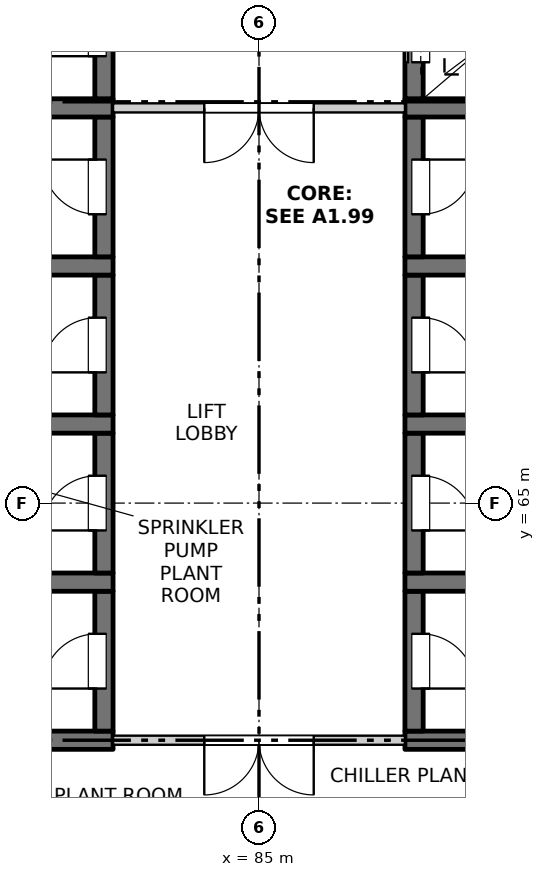
"""IFC4 building model, lengths in metres.
Left out: names, types, materials, properties, quantities, classifications, styles, units other than length and angle.
Written with IfcOpenShell. Run it as: python <this file> out.ifc"""

import sys

from ifc_helpers import new_model, si_unit, direction, frame, frame_2d, origin, place, context, subcontext, project, spatial, rectangle, extrude, element, fill, save


model = new_model("IFC4")
c1 = context("Model", 3, precision=1e-05, world=origin(), true_north=direction((0.0, 1.0)))
c2 = subcontext(c1, "Body", "Model", "MODEL_VIEW")
j1 = project(units=[si_unit("LENGTHUNIT", "METRE"), si_unit("PLANEANGLEUNIT", "RADIAN")], contexts=[c1])
p1 = place(None, origin())
s1 = spatial("IfcSite", under=j1, at=p1, CompositionType="ELEMENT")
p2 = place(p1, origin())
s2 = spatial("IfcBuilding", under=s1, at=p2, CompositionType="ELEMENT")
p3 = place(p2, frame((0.0, 0.0, 192.8)))
s3 = spatial("IfcBuildingStorey", under=s2, at=p3, CompositionType="ELEMENT", Elevation=192.8)
p4 = place(p3, frame((79.6, 61.1, -0.3), z_axis=(0.0, 0.0, 1.0), x_axis=(1.0, 0.0, 0.0)))
e1 = element("IfcWall", 1, at=p4, inside=s3, PredefinedType="SOLIDWALL", context=c2, shape_type="SweptSolid", body=[
    extrude(rectangle(XDim=3.0, YDim=0.3, at=frame_2d((1.5, 0.0))), origin(), (0.0, 0.0, 1.0), 4.5),
])
p5 = place(p3, frame((82.45, 61.25, -0.3), z_axis=(0.0, 0.0, 1.0), x_axis=(0.0, 1.0, 0.0)))
e2 = element("IfcWall", 2, at=p5, inside=s3, PredefinedType="SOLIDWALL", context=c2, shape_type="SweptSolid", body=[
    extrude(rectangle(XDim=2.3, YDim=0.3, at=frame_2d((1.15, 0.0))), origin(), (0.0, 0.0, 1.0), 4.5),
])
p6 = place(p5, frame((0.7, 0.0, 0.3)))
e3 = element("IfcOpeningElement", 3, at=p6, cuts=e2, PredefinedType="OPENING", context=c2, shape_type="SweptSolid", body=[
    extrude(rectangle(XDim=0.9, YDim=2.1, at=frame_2d((0.45, 1.05))), frame((0.0, 0.16, 0.0), z_axis=(0.0, -1.0, 0.0), x_axis=(1.0, 0.0, 0.0)), (0.0, 0.0, 1.0), 0.32),
])
p7 = place(p3, frame((79.6, 63.7, -0.3), z_axis=(0.0, 0.0, 1.0), x_axis=(1.0, 0.0, 0.0)))
e4 = element("IfcWall", 4, at=p7, inside=s3, PredefinedType="SOLIDWALL", context=c2, shape_type="SweptSolid", body=[
    extrude(rectangle(XDim=3.0, YDim=0.3, at=frame_2d((1.5, 0.0))), origin(), (0.0, 0.0, 1.0), 4.5),
])
p8 = place(p3, frame((82.45, 63.85, -0.3), z_axis=(0.0, 0.0, 1.0), x_axis=(0.0, 1.0, 0.0)))
e5 = element("IfcWall", 5, at=p8, inside=s3, PredefinedType="SOLIDWALL", context=c2, shape_type="SweptSolid", body=[
    extrude(rectangle(XDim=2.3, YDim=0.3, at=frame_2d((1.15, 0.0))), origin(), (0.0, 0.0, 1.0), 4.5),
])
p9 = place(p8, frame((0.7, 0.0, 0.3)))
e6 = element("IfcOpeningElement", 6, at=p9, cuts=e5, PredefinedType="OPENING", context=c2, shape_type="SweptSolid", body=[
    extrude(rectangle(XDim=0.9, YDim=2.1, at=frame_2d((0.45, 1.05))), frame((0.0, 0.16, 0.0), z_axis=(0.0, -1.0, 0.0), x_axis=(1.0, 0.0, 0.0)), (0.0, 0.0, 1.0), 0.32),
])
p10 = place(p3, frame((79.6, 66.3, -0.3), z_axis=(0.0, 0.0, 1.0), x_axis=(1.0, 0.0, 0.0)))
e7 = element("IfcWall", 7, at=p10, inside=s3, PredefinedType="SOLIDWALL", context=c2, shape_type="SweptSolid", body=[
    extrude(rectangle(XDim=3.0, YDim=0.3, at=frame_2d((1.5, 0.0))), origin(), (0.0, 0.0, 1.0), 4.5),
])
p11 = place(p3, frame((82.45, 66.45, -0.3), z_axis=(0.0, 0.0, 1.0), x_axis=(0.0, 1.0, 0.0)))
e8 = element("IfcWall", 8, at=p11, inside=s3, PredefinedType="SOLIDWALL", context=c2, shape_type="SweptSolid", body=[
    extrude(rectangle(XDim=2.3, YDim=0.3, at=frame_2d((1.15, 0.0))), origin(), (0.0, 0.0, 1.0), 4.5),
])
p12 = place(p11, frame((0.7, 0.0, 0.3)))
e9 = element("IfcOpeningElement", 9, at=p12, cuts=e8, PredefinedType="OPENING", context=c2, shape_type="SweptSolid", body=[
    extrude(rectangle(XDim=0.9, YDim=2.1, at=frame_2d((0.45, 1.05))), frame((0.0, 0.16, 0.0), z_axis=(0.0, -1.0, 0.0), x_axis=(1.0, 0.0, 0.0)), (0.0, 0.0, 1.0), 0.32),
])
p13 = place(p3, frame((79.6, 68.9, -0.3), z_axis=(0.0, 0.0, 1.0), x_axis=(1.0, 0.0, 0.0)))
e10 = element("IfcWall", 10, at=p13, inside=s3, PredefinedType="SOLIDWALL", context=c2, shape_type="SweptSolid", body=[
    extrude(rectangle(XDim=3.0, YDim=0.3, at=frame_2d((1.5, 0.0))), origin(), (0.0, 0.0, 1.0), 4.5),
])
p14 = place(p3, frame((82.45, 69.05, -0.3), z_axis=(0.0, 0.0, 1.0), x_axis=(0.0, 1.0, 0.0)))
e11 = element("IfcWall", 11, at=p14, inside=s3, PredefinedType="SOLIDWALL", context=c2, shape_type="SweptSolid", body=[
    extrude(rectangle(XDim=2.3, YDim=0.3, at=frame_2d((1.15, 0.0))), origin(), (0.0, 0.0, 1.0), 4.5),
])
p15 = place(p14, frame((0.7, 0.0, 0.3)))
e12 = element("IfcOpeningElement", 12, at=p15, cuts=e11, PredefinedType="OPENING", context=c2, shape_type="SweptSolid", body=[
    extrude(rectangle(XDim=0.9, YDim=2.1, at=frame_2d((0.45, 1.05))), frame((0.0, 0.16, 0.0), z_axis=(0.0, -1.0, 0.0), x_axis=(1.0, 0.0, 0.0)), (0.0, 0.0, 1.0), 0.32),
])
p16 = place(p3, frame((79.6, 71.5, -0.3), z_axis=(0.0, 0.0, 1.0), x_axis=(1.0, 0.0, 0.0)))
e13 = element("IfcWall", 13, at=p16, inside=s3, PredefinedType="SOLIDWALL", context=c2, shape_type="SweptSolid", body=[
    extrude(rectangle(XDim=3.0, YDim=0.3, at=frame_2d((1.5, 0.0))), origin(), (0.0, 0.0, 1.0), 4.5),
])
p17 = place(p3, frame((82.45, 71.65, -0.3), z_axis=(0.0, 0.0, 1.0), x_axis=(0.0, 1.0, 0.0)))
e14 = element("IfcWall", 14, at=p17, inside=s3, PredefinedType="SOLIDWALL", context=c2, shape_type="SweptSolid", body=[
    extrude(rectangle(XDim=2.3, YDim=0.3, at=frame_2d((1.15, 0.0))), origin(), (0.0, 0.0, 1.0), 4.5),
])
p18 = place(p17, frame((0.7, 0.0, 0.3)))
e15 = element("IfcOpeningElement", 15, at=p18, cuts=e14, PredefinedType="OPENING", context=c2, shape_type="SweptSolid", body=[
    extrude(rectangle(XDim=0.9, YDim=2.1, at=frame_2d((0.45, 1.05))), frame((0.0, 0.16, 0.0), z_axis=(0.0, -1.0, 0.0), x_axis=(1.0, 0.0, 0.0)), (0.0, 0.0, 1.0), 0.32),
])
p19 = place(p3, frame((87.4, 61.1, -0.3), z_axis=(0.0, 0.0, 1.0), x_axis=(1.0, 0.0, 0.0)))
e16 = element("IfcWall", 16, at=p19, inside=s3, PredefinedType="SOLIDWALL", context=c2, shape_type="SweptSolid", body=[
    extrude(rectangle(XDim=3.0, YDim=0.3, at=frame_2d((1.5, 0.0))), origin(), (0.0, 0.0, 1.0), 4.5),
])
p20 = place(p3, frame((87.55, 61.25, -0.3), z_axis=(0.0, 0.0, 1.0), x_axis=(0.0, 1.0, 0.0)))
e17 = element("IfcWall", 17, at=p20, inside=s3, PredefinedType="SOLIDWALL", context=c2, shape_type="SweptSolid", body=[
    extrude(rectangle(XDim=2.3, YDim=0.3, at=frame_2d((1.15, 0.0))), origin(), (0.0, 0.0, 1.0), 4.5),
])
p21 = place(p20, frame((0.7, 0.0, 0.3)))
e18 = element("IfcOpeningElement", 18, at=p21, cuts=e17, PredefinedType="OPENING", context=c2, shape_type="SweptSolid", body=[
    extrude(rectangle(XDim=0.9, YDim=2.1, at=frame_2d((0.45, 1.05))), frame((0.0, 0.16, 0.0), z_axis=(0.0, -1.0, 0.0), x_axis=(1.0, 0.0, 0.0)), (0.0, 0.0, 1.0), 0.32),
])
p22 = place(p3, frame((87.4, 63.7, -0.3), z_axis=(0.0, 0.0, 1.0), x_axis=(1.0, 0.0, 0.0)))
e19 = element("IfcWall", 19, at=p22, inside=s3, PredefinedType="SOLIDWALL", context=c2, shape_type="SweptSolid", body=[
    extrude(rectangle(XDim=3.0, YDim=0.3, at=frame_2d((1.5, 0.0))), origin(), (0.0, 0.0, 1.0), 4.5),
])
p23 = place(p3, frame((87.55, 63.85, -0.3), z_axis=(0.0, 0.0, 1.0), x_axis=(0.0, 1.0, 0.0)))
e20 = element("IfcWall", 20, at=p23, inside=s3, PredefinedType="SOLIDWALL", context=c2, shape_type="SweptSolid", body=[
    extrude(rectangle(XDim=2.3, YDim=0.3, at=frame_2d((1.15, 0.0))), origin(), (0.0, 0.0, 1.0), 4.5),
])
p24 = place(p23, frame((0.7, 0.0, 0.3)))
e21 = element("IfcOpeningElement", 21, at=p24, cuts=e20, PredefinedType="OPENING", context=c2, shape_type="SweptSolid", body=[
    extrude(rectangle(XDim=0.9, YDim=2.1, at=frame_2d((0.45, 1.05))), frame((0.0, 0.16, 0.0), z_axis=(0.0, -1.0, 0.0), x_axis=(1.0, 0.0, 0.0)), (0.0, 0.0, 1.0), 0.32),
])
p25 = place(p3, frame((87.4, 66.3, -0.3), z_axis=(0.0, 0.0, 1.0), x_axis=(1.0, 0.0, 0.0)))
e22 = element("IfcWall", 22, at=p25, inside=s3, PredefinedType="SOLIDWALL", context=c2, shape_type="SweptSolid", body=[
    extrude(rectangle(XDim=3.0, YDim=0.3, at=frame_2d((1.5, 0.0))), origin(), (0.0, 0.0, 1.0), 4.5),
])
p26 = place(p3, frame((87.55, 66.45, -0.3), z_axis=(0.0, 0.0, 1.0), x_axis=(0.0, 1.0, 0.0)))
e23 = element("IfcWall", 23, at=p26, inside=s3, PredefinedType="SOLIDWALL", context=c2, shape_type="SweptSolid", body=[
    extrude(rectangle(XDim=2.3, YDim=0.3, at=frame_2d((1.15, 0.0))), origin(), (0.0, 0.0, 1.0), 4.5),
])
p27 = place(p26, frame((0.7, 0.0, 0.3)))
e24 = element("IfcOpeningElement", 24, at=p27, cuts=e23, PredefinedType="OPENING", context=c2, shape_type="SweptSolid", body=[
    extrude(rectangle(XDim=0.9, YDim=2.1, at=frame_2d((0.45, 1.05))), frame((0.0, 0.16, 0.0), z_axis=(0.0, -1.0, 0.0), x_axis=(1.0, 0.0, 0.0)), (0.0, 0.0, 1.0), 0.32),
])
p28 = place(p3, frame((87.4, 68.9, -0.3), z_axis=(0.0, 0.0, 1.0), x_axis=(1.0, 0.0, 0.0)))
e25 = element("IfcWall", 25, at=p28, inside=s3, PredefinedType="SOLIDWALL", context=c2, shape_type="SweptSolid", body=[
    extrude(rectangle(XDim=3.0, YDim=0.3, at=frame_2d((1.5, 0.0))), origin(), (0.0, 0.0, 1.0), 4.5),
])
p29 = place(p3, frame((87.55, 69.05, -0.3), z_axis=(0.0, 0.0, 1.0), x_axis=(0.0, 1.0, 0.0)))
e26 = element("IfcWall", 26, at=p29, inside=s3, PredefinedType="SOLIDWALL", context=c2, shape_type="SweptSolid", body=[
    extrude(rectangle(XDim=2.3, YDim=0.3, at=frame_2d((1.15, 0.0))), origin(), (0.0, 0.0, 1.0), 4.5),
])
p30 = place(p29, frame((0.7, 0.0, 0.3)))
e27 = element("IfcOpeningElement", 27, at=p30, cuts=e26, PredefinedType="OPENING", context=c2, shape_type="SweptSolid", body=[
    extrude(rectangle(XDim=0.9, YDim=2.1, at=frame_2d((0.45, 1.05))), frame((0.0, 0.16, 0.0), z_axis=(0.0, -1.0, 0.0), x_axis=(1.0, 0.0, 0.0)), (0.0, 0.0, 1.0), 0.32),
])
p31 = place(p3, frame((87.4, 71.5, -0.3), z_axis=(0.0, 0.0, 1.0), x_axis=(1.0, 0.0, 0.0)))
e28 = element("IfcWall", 28, at=p31, inside=s3, PredefinedType="SOLIDWALL", context=c2, shape_type="SweptSolid", body=[
    extrude(rectangle(XDim=3.0, YDim=0.3, at=frame_2d((1.5, 0.0))), origin(), (0.0, 0.0, 1.0), 4.5),
])
p32 = place(p3, frame((87.55, 71.65, -0.3), z_axis=(0.0, 0.0, 1.0), x_axis=(0.0, 1.0, 0.0)))
e29 = element("IfcWall", 29, at=p32, inside=s3, PredefinedType="SOLIDWALL", context=c2, shape_type="SweptSolid", body=[
    extrude(rectangle(XDim=2.3, YDim=0.3, at=frame_2d((1.15, 0.0))), origin(), (0.0, 0.0, 1.0), 4.5),
])
p33 = place(p32, frame((0.6, 0.0, 0.3)))
e30 = element("IfcOpeningElement", 30, at=p33, cuts=e29, PredefinedType="OPENING", context=c2, shape_type="SweptSolid", body=[
    extrude(rectangle(XDim=1.1, YDim=2.1, at=frame_2d((0.55, 1.05))), frame((0.0, 0.16, 0.0), z_axis=(0.0, -1.0, 0.0), x_axis=(1.0, 0.0, 0.0)), (0.0, 0.0, 1.0), 0.32),
])
p34 = place(p3, frame((82.6, 61.1, 0.0), z_axis=(0.0, 0.0, 1.0), x_axis=(1.0, 0.0, 0.0)))
e31 = element("IfcWall", 31, at=p34, inside=s3, PredefinedType="PARTITIONING", context=c2, shape_type="SweptSolid", body=[
    extrude(rectangle(XDim=4.8, YDim=0.15, at=frame_2d((2.4, 0.0))), origin(), (0.0, 0.0, 1.0), 4.2),
])
p35 = place(p34, frame((1.5, 0.0, 0.0)))
e32 = element("IfcOpeningElement", 32, at=p35, cuts=e31, PredefinedType="OPENING", context=c2, shape_type="SweptSolid", body=[
    extrude(rectangle(XDim=1.8, YDim=2.1, at=frame_2d((0.9, 1.05))), frame((0.0, 0.085, 0.0), z_axis=(0.0, -1.0, 0.0), x_axis=(1.0, 0.0, 0.0)), (0.0, 0.0, 1.0), 0.17),
])
p36 = place(p3, frame((82.6, 71.5, 0.0), z_axis=(0.0, 0.0, 1.0), x_axis=(1.0, 0.0, 0.0)))
e33 = element("IfcWall", 33, at=p36, inside=s3, PredefinedType="PARTITIONING", context=c2, shape_type="SweptSolid", body=[
    extrude(rectangle(XDim=4.8, YDim=0.15, at=frame_2d((2.4, 0.0))), origin(), (0.0, 0.0, 1.0), 4.2),
])
p37 = place(p36, frame((1.5, 0.0, 0.0)))
e34 = element("IfcOpeningElement", 34, at=p37, cuts=e33, PredefinedType="OPENING", context=c2, shape_type="SweptSolid", body=[
    extrude(rectangle(XDim=1.8, YDim=2.1, at=frame_2d((0.9, 1.05))), frame((0.0, 0.085, 0.0), z_axis=(0.0, -1.0, 0.0), x_axis=(1.0, 0.0, 0.0)), (0.0, 0.0, 1.0), 0.17),
])
p38 = place(p35, origin())
e35 = element("IfcDoor", 35, at=p38, inside=s3, OperationType="DOUBLE_DOOR_SINGLE_SWING", PredefinedType="DOOR", context=c2, shape_type="SweptSolid", body=[
    extrude(rectangle(XDim=1.8, YDim=2.1, at=frame_2d((0.9, 1.05))), frame((0.0, 0.025, 0.0), z_axis=(0.0, -1.0, 0.0), x_axis=(1.0, 0.0, 0.0)), (0.0, 0.0, 1.0), 0.05),
])
fill(e32, e35)
p39 = place(p6, origin())
e36 = element("IfcDoor", 36, at=p39, inside=s3, OperationType="SINGLE_SWING_LEFT", PredefinedType="DOOR", context=c2, shape_type="SweptSolid", body=[
    extrude(rectangle(XDim=0.9, YDim=2.1, at=frame_2d((0.45, 1.05))), frame((0.0, 0.135, 0.0), z_axis=(0.0, -1.0, 0.0), x_axis=(1.0, 0.0, 0.0)), (0.0, 0.0, 1.0), 0.05),
])
fill(e3, e36)
p40 = place(p21, origin())
e37 = element("IfcDoor", 37, at=p40, inside=s3, OperationType="SINGLE_SWING_RIGHT", PredefinedType="DOOR", context=c2, shape_type="SweptSolid", body=[
    extrude(rectangle(XDim=0.9, YDim=2.1, at=frame_2d((0.45, 1.05))), frame((0.0, -0.085, 0.0), z_axis=(0.0, -1.0, 0.0), x_axis=(1.0, 0.0, 0.0)), (0.0, 0.0, 1.0), 0.05),
])
fill(e18, e37)
p41 = place(p9, origin())
e38 = element("IfcDoor", 38, at=p41, inside=s3, OperationType="SINGLE_SWING_LEFT", PredefinedType="DOOR", context=c2, shape_type="SweptSolid", body=[
    extrude(rectangle(XDim=0.9, YDim=2.1, at=frame_2d((0.45, 1.05))), frame((0.0, 0.135, 0.0), z_axis=(0.0, -1.0, 0.0), x_axis=(1.0, 0.0, 0.0)), (0.0, 0.0, 1.0), 0.05),
])
fill(e6, e38)
p42 = place(p24, origin())
e39 = element("IfcDoor", 39, at=p42, inside=s3, OperationType="SINGLE_SWING_RIGHT", PredefinedType="DOOR", context=c2, shape_type="SweptSolid", body=[
    extrude(rectangle(XDim=0.9, YDim=2.1, at=frame_2d((0.45, 1.05))), frame((0.0, -0.085, 0.0), z_axis=(0.0, -1.0, 0.0), x_axis=(1.0, 0.0, 0.0)), (0.0, 0.0, 1.0), 0.05),
])
fill(e21, e39)
p43 = place(p12, origin())
e40 = element("IfcDoor", 40, at=p43, inside=s3, OperationType="SINGLE_SWING_LEFT", PredefinedType="DOOR", context=c2, shape_type="SweptSolid", body=[
    extrude(rectangle(XDim=0.9, YDim=2.1, at=frame_2d((0.45, 1.05))), frame((0.0, 0.135, 0.0), z_axis=(0.0, -1.0, 0.0), x_axis=(1.0, 0.0, 0.0)), (0.0, 0.0, 1.0), 0.05),
])
fill(e9, e40)
p44 = place(p27, origin())
e41 = element("IfcDoor", 41, at=p44, inside=s3, OperationType="SINGLE_SWING_RIGHT", PredefinedType="DOOR", context=c2, shape_type="SweptSolid", body=[
    extrude(rectangle(XDim=0.9, YDim=2.1, at=frame_2d((0.45, 1.05))), frame((0.0, -0.085, 0.0), z_axis=(0.0, -1.0, 0.0), x_axis=(1.0, 0.0, 0.0)), (0.0, 0.0, 1.0), 0.05),
])
fill(e24, e41)
p45 = place(p15, origin())
e42 = element("IfcDoor", 42, at=p45, inside=s3, OperationType="SINGLE_SWING_RIGHT", PredefinedType="DOOR", context=c2, shape_type="SweptSolid", body=[
    extrude(rectangle(XDim=0.9, YDim=2.1, at=frame_2d((0.45, 1.05))), frame((0.0, 0.135, 0.0), z_axis=(0.0, -1.0, 0.0), x_axis=(1.0, 0.0, 0.0)), (0.0, 0.0, 1.0), 0.05),
])
fill(e12, e42)
p46 = place(p30, origin())
e43 = element("IfcDoor", 43, at=p46, inside=s3, OperationType="SINGLE_SWING_LEFT", PredefinedType="DOOR", context=c2, shape_type="SweptSolid", body=[
    extrude(rectangle(XDim=0.9, YDim=2.1, at=frame_2d((0.45, 1.05))), frame((0.0, -0.085, 0.0), z_axis=(0.0, -1.0, 0.0), x_axis=(1.0, 0.0, 0.0)), (0.0, 0.0, 1.0), 0.05),
])
fill(e27, e43)
p47 = place(p37, origin())
e44 = element("IfcDoor", 44, at=p47, inside=s3, OperationType="DOUBLE_DOOR_SINGLE_SWING", PredefinedType="DOOR", context=c2, shape_type="SweptSolid", body=[
    extrude(rectangle(XDim=1.8, YDim=2.1, at=frame_2d((0.9, 1.05))), frame((0.0, 0.025, 0.0), z_axis=(0.0, -1.0, 0.0), x_axis=(1.0, 0.0, 0.0)), (0.0, 0.0, 1.0), 0.05),
])
fill(e34, e44)
p48 = place(p18, origin())
e45 = element("IfcDoor", 45, at=p48, inside=s3, OperationType="SINGLE_SWING_LEFT", PredefinedType="DOOR", context=c2, shape_type="SweptSolid", body=[
    extrude(rectangle(XDim=0.9, YDim=2.1, at=frame_2d((0.45, 1.05))), frame((0.0, 0.135, 0.0), z_axis=(0.0, -1.0, 0.0), x_axis=(1.0, 0.0, 0.0)), (0.0, 0.0, 1.0), 0.05),
])
fill(e15, e45)
p49 = place(p33, origin())
e46 = element("IfcDoor", 46, at=p49, inside=s3, OperationType="SLIDING_TO_LEFT", PredefinedType="DOOR", context=c2, shape_type="SweptSolid", body=[
    extrude(rectangle(XDim=1.1, YDim=2.1, at=frame_2d((0.55, 1.05))), frame((0.0, -0.085, 0.0), z_axis=(0.0, -1.0, 0.0), x_axis=(1.0, 0.0, 0.0)), (0.0, 0.0, 1.0), 0.05),
])
fill(e30, e46)
save(model, sys.argv[1])
